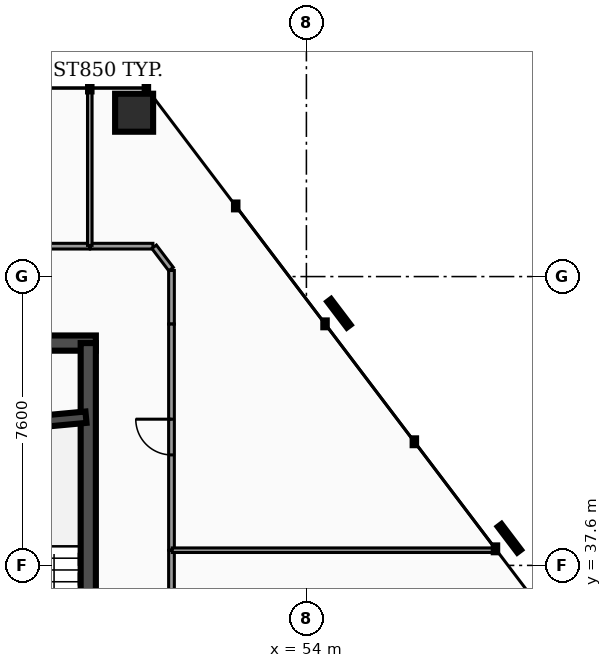
"""IFC4 building model, lengths in metres.
Left out: names, types, materials, properties, quantities, classifications, styles, units other than length and angle.
Written with IfcOpenShell. Run it as: python <this file> out.ifc"""

import sys

from ifc_helpers import new_model, si_unit, direction, frame, frame_2d, origin, origin_2d, place, context, subcontext, project, spatial, rectangle, hollow_rectangle, extrude, element, fill, save


model = new_model("IFC4")
c1 = context("Model", 3, precision=1e-05, world=origin(), true_north=direction((0.0, 1.0)))
c2 = subcontext(c1, "Body", "Model", "MODEL_VIEW")
j1 = project(units=[si_unit("LENGTHUNIT", "METRE"), si_unit("PLANEANGLEUNIT", "RADIAN")], contexts=[c1])
p1 = place(None, origin())
s1 = spatial("IfcSite", under=j1, at=p1, CompositionType="ELEMENT")
p2 = place(p1, origin())
s2 = spatial("IfcBuilding", under=s1, at=p2, CompositionType="ELEMENT")
p3 = place(p2, frame((0.0, 0.0, 27.54)))
s3 = spatial("IfcBuildingStorey", under=s2, at=p3, CompositionType="ELEMENT", Elevation=27.54)
p4 = place(p3, frame((28.4, 43.45, 0.0), z_axis=(0.0, 0.0, 1.0), x_axis=(1.0, 0.0, 0.0)))
e1 = element("IfcWall", 1, at=p4, inside=s3, PredefinedType="SHEAR", context=c2, shape_type="SweptSolid", body=[
    extrude(rectangle(XDim=20.06, YDim=0.4, at=frame_2d((10.03, 0.0))), origin(), (0.0, 0.0, 1.0), 3.82),
])
p5 = place(p3, frame((48.26, 33.25, 0.0), z_axis=(0.0, 0.0, 1.0), x_axis=(0.0, 1.0, 0.0)))
e2 = element("IfcWall", 2, at=p5, inside=s3, PredefinedType="SHEAR", context=c2, shape_type="SweptSolid", body=[
    extrude(rectangle(XDim=10.2, YDim=0.4, at=frame_2d((5.1, 0.0))), origin(), (0.0, 0.0, 1.0), 3.82),
])
p6 = place(p3, frame((44.98, 41.2, 0.0), z_axis=(0.0, 0.0, 1.0), x_axis=(0.995686468965, 0.09278176286, 0.0)))
e3 = element("IfcWall", 3, at=p6, inside=s3, PredefinedType="SHEAR", context=c2, shape_type="SweptSolid", body=[
    extrude(rectangle(XDim=3.234, YDim=0.3, at=frame_2d((1.617, 0.0))), origin(), (0.0, 0.0, 1.0), 3.82),
])
p7 = place(p3, frame((49.466, 49.511, 0.0), z_axis=(0.0, 0.0, 1.0), x_axis=(1.0, 0.0, 0.0)))
e4 = element("IfcColumn", 4, at=p7, inside=s3, PredefinedType="COLUMN", context=c2, shape_type="SweptSolid", body=[
    extrude(hollow_rectangle(XDim=1.0, YDim=1.0, WallThickness=0.05, at=origin_2d()), origin(), (0.0, 0.0, 1.0), 3.82),
])
p8 = place(p3, frame((50.45, 30.17, 0.0), z_axis=(0.0, 0.0, 1.0), x_axis=(0.0, 1.0, 0.0)))
e5 = element("IfcWall", 5, at=p8, inside=s3, PredefinedType="PARTITIONING", context=c2, shape_type="SweptSolid", body=[
    extrude(rectangle(XDim=7.825, YDim=0.15, at=frame_2d((3.913, 0.0))), origin(), (0.0, 0.0, 1.0), 2.777),
])
p9 = place(p8, frame((3.442, 0.0, 0.0)))
e6 = element("IfcOpeningElement", 6, at=p9, cuts=e5, PredefinedType="OPENING", context=c2, shape_type="SweptSolid", body=[
    extrude(rectangle(XDim=0.94, YDim=2.05, at=frame_2d((0.47, 1.025))), frame((0.0, 0.085, 0.0), z_axis=(0.0, -1.0, 0.0), x_axis=(1.0, 0.0, 0.0)), (0.0, 0.0, 1.0), 0.17),
])
p10 = place(p3, frame((48.315, 46.0, 0.0), z_axis=(0.0, 0.0, 1.0), x_axis=(1.0, 0.0, 0.0)))
e7 = element("IfcWall", 7, at=p10, inside=s3, PredefinedType="PARTITIONING", context=c2, shape_type="SweptSolid", body=[
    extrude(rectangle(XDim=1.646, YDim=0.15, at=frame_2d((0.823, 0.0))), origin(), (0.0, 0.0, 1.0), 2.777),
])
p11 = place(p3, frame((49.993, 45.984, 0.0), z_axis=(0.0, 0.0, 1.0), x_axis=(0.603704571474, -0.797208122375, 0.0)))
e8 = element("IfcWall", 8, at=p11, inside=s3, PredefinedType="PARTITIONING", context=c2, shape_type="SweptSolid", body=[
    extrude(rectangle(XDim=0.737, YDim=0.15, at=frame_2d((0.368, 0.0))), origin(), (0.0, 0.0, 1.0), 2.777),
])
p12 = place(p3, frame((50.45, 43.95, 0.0), z_axis=(0.0, 0.0, 1.0), x_axis=(0.0, 1.0, 0.0)))
e9 = element("IfcWall", 9, at=p12, inside=s3, PredefinedType="PARTITIONING", context=c2, shape_type="SweptSolid", body=[
    extrude(rectangle(XDim=1.411, YDim=0.15, at=frame_2d((0.706, 0.0))), origin(), (0.0, 0.0, 1.0), 2.777),
])
p13 = place(p3, frame((50.45, 38.005, 0.0), z_axis=(0.0, 0.0, 1.0), x_axis=(0.0, 1.0, 0.0)))
e10 = element("IfcWall", 10, at=p13, inside=s3, PredefinedType="PARTITIONING", context=c2, shape_type="SweptSolid", body=[
    extrude(rectangle(XDim=5.945, YDim=0.15, at=frame_2d((2.973, 0.0))), origin(), (0.0, 0.0, 1.0), 2.777),
])
p14 = place(p13, frame((2.502, 0.0, 0.0)))
e11 = element("IfcOpeningElement", 11, at=p14, cuts=e10, PredefinedType="OPENING", context=c2, shape_type="SweptSolid", body=[
    extrude(rectangle(XDim=0.94, YDim=2.05, at=frame_2d((0.47, 1.025))), frame((0.0, 0.085, 0.0), z_axis=(0.0, -1.0, 0.0), x_axis=(1.0, 0.0, 0.0)), (0.0, 0.0, 1.0), 0.17),
])
p15 = place(p3, frame((42.605, 46.0, 0.0), z_axis=(0.0, 0.0, 1.0), x_axis=(1.0, 0.0, 0.0)))
e12 = element("IfcWall", 12, at=p15, inside=s3, PredefinedType="PARTITIONING", context=c2, shape_type="SweptSolid", body=[
    extrude(rectangle(XDim=5.69, YDim=0.15, at=frame_2d((2.845, 0.0))), origin(), (0.0, 0.0, 1.0), 2.777),
])
p16 = place(p15, frame((2.375, 0.0, 0.0)))
e13 = element("IfcOpeningElement", 13, at=p16, cuts=e12, PredefinedType="OPENING", context=c2, shape_type="SweptSolid", body=[
    extrude(rectangle(XDim=0.94, YDim=2.05, at=frame_2d((0.47, 1.025))), frame((0.0, 0.085, 0.0), z_axis=(0.0, -1.0, 0.0), x_axis=(1.0, 0.0, 0.0)), (0.0, 0.0, 1.0), 0.17),
])
p17 = place(p3, frame((50.47, 38.0, 0.0), z_axis=(0.0, 0.0, 1.0), x_axis=(1.0, 0.0, 0.0)))
e14 = element("IfcWall", 14, at=p17, inside=s3, PredefinedType="PARTITIONING", context=c2, shape_type="SweptSolid", body=[
    extrude(rectangle(XDim=8.517, YDim=0.12, at=frame_2d((4.259, 0.0))), origin(), (0.0, 0.0, 1.0), 2.777),
])
p18 = place(p3, frame((48.3, 46.02, 0.0), z_axis=(0.0, 0.0, 1.0), x_axis=(0.0, 1.0, 0.0)))
e15 = element("IfcWall", 15, at=p18, inside=s3, PredefinedType="PARTITIONING", context=c2, shape_type="SweptSolid", body=[
    extrude(rectangle(XDim=4.126, YDim=0.12, at=frame_2d((2.063, 0.0))), origin(), (0.0, 0.0, 1.0), 2.777),
])
p19 = place(p14, origin())
e16 = element("IfcDoor", 16, at=p19, inside=s3, OperationType="SINGLE_SWING_RIGHT", PredefinedType="DOOR", context=c2, shape_type="SweptSolid", body=[
    extrude(rectangle(XDim=0.94, YDim=2.05, at=frame_2d((0.47, 1.025))), frame((0.0, 0.025, 0.0), z_axis=(0.0, -1.0, 0.0), x_axis=(1.0, 0.0, 0.0)), (0.0, 0.0, 1.0), 0.05),
])
fill(e11, e16)
save(model, sys.argv[1])
